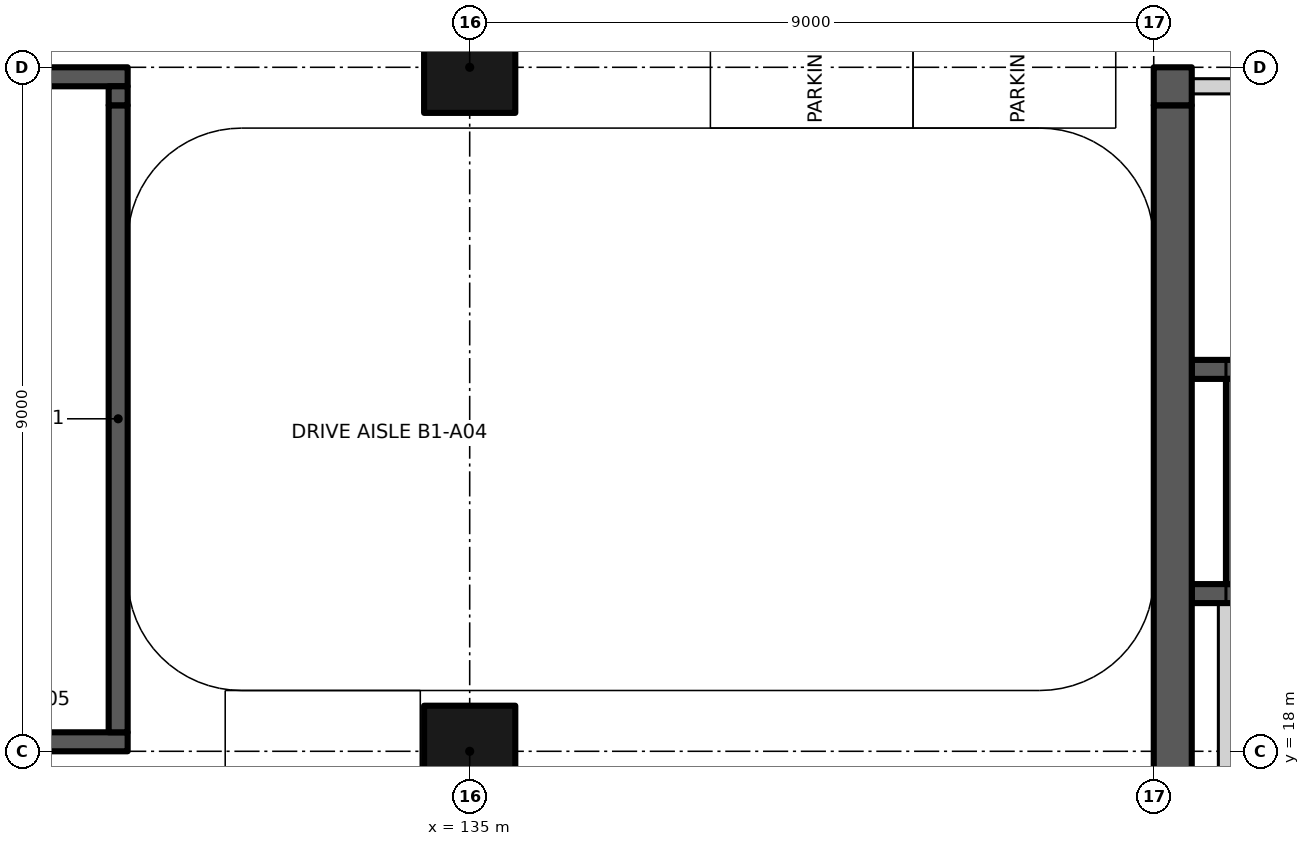
"""IFC4 building model, lengths in metres.
Left out: names, types, materials, properties, quantities, classifications, styles, units other than length and angle.
Written with IfcOpenShell. Run it as: python <this file> out.ifc"""

import sys

from ifc_helpers import new_model, si_unit, direction, frame, frame_2d, origin, origin_2d, place, context, subcontext, project, spatial, rectangle, extrude, element, save


model = new_model("IFC4")
c1 = context("Model", 3, precision=1e-05, world=origin(), true_north=direction((0.0, 1.0)))
c2 = subcontext(c1, "Body", "Model", "MODEL_VIEW")
j1 = project(units=[si_unit("LENGTHUNIT", "METRE"), si_unit("PLANEANGLEUNIT", "RADIAN")], contexts=[c1])
p1 = place(None, origin())
s1 = spatial("IfcSite", under=j1, at=p1, CompositionType="ELEMENT")
p2 = place(p1, origin())
s2 = spatial("IfcBuilding", under=s1, at=p2, CompositionType="ELEMENT")
p3 = place(p2, frame((0.0, 0.0, -5.1)))
s3 = spatial("IfcBuildingStorey", under=s2, at=p3, CompositionType="ELEMENT", Elevation=-5.1)
for number, where, z_axis, x_axis in (
    (1, (135.0, 18.0, 0.0), (0.0, 0.0, 1.0), (1.0, 0.0, 0.0)),
    (2, (135.0, 27.0, 0.0), (0.0, 0.0, 1.0), (1.0, 0.0, 0.0)),
):
    element("IfcColumn", number, at=place(p3, frame(where, z_axis=z_axis, x_axis=x_axis)), inside=s3, PredefinedType="COLUMN", context=c2, shape_type="SweptSolid", body=[
        extrude(rectangle(XDim=1.2, YDim=1.2, at=origin_2d()), origin(), (0.0, 0.0, 1.0), 5.1),
    ])
p4 = place(p3, frame((144.5, 20.075, 0.0), z_axis=(0.0, 0.0, 1.0), x_axis=(1.0, 0.0, 0.0)))
e3 = element("IfcWall", 3, at=p4, inside=s3, PredefinedType="SHEAR", context=c2, shape_type="SweptSolid", body=[
    extrude(rectangle(XDim=6.6, YDim=0.25, at=frame_2d((3.3, 0.0))), origin(), (0.0, 0.0, 1.0), 5.1),
])
p5 = place(p4, frame((1.5, 0.0, 0.0)))
e4 = element("IfcOpeningElement", 4, at=p5, cuts=e3, PredefinedType="OPENING", context=c2, shape_type="SweptSolid", body=[
    extrude(rectangle(XDim=1.1, YDim=2.1, at=frame_2d((0.55, 1.05))), frame((0.0, 0.135, 0.0), z_axis=(0.0, -1.0, 0.0), x_axis=(1.0, 0.0, 0.0)), (0.0, 0.0, 1.0), 0.27),
])
p6 = place(p4, frame((4.45, 0.0, 0.0)))
e5 = element("IfcOpeningElement", 5, at=p6, cuts=e3, PredefinedType="OPENING", context=c2, shape_type="SweptSolid", body=[
    extrude(rectangle(XDim=1.1, YDim=2.1, at=frame_2d((0.55, 1.05))), frame((0.0, 0.135, 0.0), z_axis=(0.0, -1.0, 0.0), x_axis=(1.0, 0.0, 0.0)), (0.0, 0.0, 1.0), 0.27),
])
p7 = place(p3, frame((144.5, 23.025, 0.0), z_axis=(0.0, 0.0, 1.0), x_axis=(1.0, 0.0, 0.0)))
e6 = element("IfcWall", 6, at=p7, inside=s3, PredefinedType="SHEAR", context=c2, shape_type="SweptSolid", body=[
    extrude(rectangle(XDim=6.6, YDim=0.25, at=frame_2d((3.3, 0.0))), origin(), (0.0, 0.0, 1.0), 5.1),
])
p8 = place(p3, frame((145.075, 20.2, 0.0), z_axis=(0.0, 0.0, 1.0), x_axis=(0.0, 1.0, 0.0)))
e7 = element("IfcWall", 7, at=p8, inside=s3, PredefinedType="SHEAR", context=c2, shape_type="SweptSolid", body=[
    extrude(rectangle(XDim=2.7, YDim=0.25, at=frame_2d((1.35, 0.0))), origin(), (0.0, 0.0, 1.0), 5.1),
])
p9 = place(p3, frame((126.6, 18.125, 0.0), z_axis=(0.0, 0.0, 1.0), x_axis=(1.0, 0.0, 0.0)))
e8 = element("IfcWall", 8, at=p9, inside=s3, PredefinedType="SOLIDWALL", context=c2, shape_type="SweptSolid", body=[
    extrude(rectangle(XDim=3.9, YDim=0.25, at=frame_2d((1.95, 0.0))), origin(), (0.0, 0.0, 1.0), 4.75),
])
p10 = place(p3, frame((144.5, 26.75, 0.0), z_axis=(0.0, 0.0, 1.0), x_axis=(1.0, 0.0, 0.0)))
e9 = element("IfcWall", 9, at=p10, inside=s3, PredefinedType="PARTITIONING", context=c2, shape_type="SweptSolid", body=[
    extrude(rectangle(XDim=17.0, YDim=0.2, at=frame_2d((8.5, 0.0))), origin(), (0.0, 0.0, 1.0), 4.2),
])
p11 = place(p3, frame((126.6, 26.875, 0.0), z_axis=(0.0, 0.0, 1.0), x_axis=(1.0, 0.0, 0.0)))
e10 = element("IfcWall", 10, at=p11, inside=s3, PredefinedType="SOLIDWALL", context=c2, shape_type="SweptSolid", body=[
    extrude(rectangle(XDim=3.9, YDim=0.25, at=frame_2d((1.95, 0.0))), origin(), (0.0, 0.0, 1.0), 4.2),
])
p12 = place(p3, frame((130.375, 18.25, 0.0), z_axis=(0.0, 0.0, 1.0), x_axis=(0.0, 1.0, 0.0)))
e11 = element("IfcWall", 11, at=p12, inside=s3, PredefinedType="SOLIDWALL", context=c2, shape_type="SweptSolid", body=[
    extrude(rectangle(XDim=8.25, YDim=0.25, at=frame_2d((4.125, 0.0))), origin(), (0.0, 0.0, 1.0), 4.75),
])
p13 = place(p3, frame((130.375, 26.5, 0.0), z_axis=(0.0, 0.0, 1.0), x_axis=(0.0, 1.0, 0.0)))
e12 = element("IfcWall", 12, at=p13, inside=s3, PredefinedType="SOLIDWALL", context=c2, shape_type="SweptSolid", body=[
    extrude(rectangle(XDim=0.25, YDim=0.25, at=frame_2d((0.125, 0.0))), origin(), (0.0, 0.0, 1.0), 4.2),
])
p14 = place(p3, frame((144.25, 9.5, 0.0), z_axis=(0.0, 0.0, 1.0), x_axis=(0.0, 1.0, 0.0)))
e13 = element("IfcWall", 13, at=p14, inside=s3, PredefinedType="SHEAR", context=c2, shape_type="SweptSolid", body=[
    extrude(rectangle(XDim=17.0, YDim=0.5, at=frame_2d((8.5, 0.0))), origin(), (0.0, 0.0, 1.0), 4.75),
])
p15 = place(p14, frame((3.6, 0.0, 0.0)))
e14 = element("IfcOpeningElement", 14, at=p15, cuts=e13, PredefinedType="OPENING", context=c2, shape_type="SweptSolid", body=[
    extrude(rectangle(XDim=1.6, YDim=2.4, at=frame_2d((0.8, 1.2))), frame((0.0, 0.26, 0.0), z_axis=(0.0, -1.0, 0.0), x_axis=(1.0, 0.0, 0.0)), (0.0, 0.0, 1.0), 0.52),
])
p16 = place(p3, frame((144.25, 26.5, 0.0), z_axis=(0.0, 0.0, 1.0), x_axis=(0.0, 1.0, 0.0)))
e15 = element("IfcWall", 15, at=p16, inside=s3, PredefinedType="SHEAR", context=c2, shape_type="SweptSolid", body=[
    extrude(rectangle(XDim=0.5, YDim=0.5, at=frame_2d((0.25, 0.0))), origin(), (0.0, 0.0, 1.0), 4.2),
])
p17 = place(p3, frame((144.95, 17.05, 0.0), z_axis=(0.0, 0.0, 1.0), x_axis=(0.0, 1.0, 0.0)))
e16 = element("IfcWall", 16, at=p17, inside=s3, PredefinedType="PARTITIONING", context=c2, shape_type="SweptSolid", body=[
    extrude(rectangle(XDim=2.9, YDim=0.2, at=frame_2d((1.45, 0.0))), origin(), (0.0, 0.0, 1.0), 4.75),
])
save(model, sys.argv[1])
